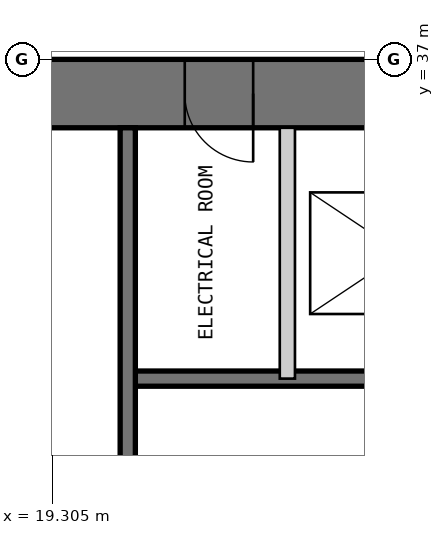
"""IFC4 building model, lengths in metres.
Left out: names, types, materials, properties, quantities, classifications, styles, units other than length and angle.
Written with IfcOpenShell. Run it as: python <this file> out.ifc"""

import sys

from ifc_helpers import new_model, si_unit, direction, frame, frame_2d, origin, place, context, subcontext, project, spatial, polyline, rectangle, outline, extrude, element, fill, save


model = new_model("IFC4")
c1 = context("Model", 3, precision=1e-05, world=origin(), true_north=direction((0.0, 1.0)))
c2 = subcontext(c1, "Body", "Model", "MODEL_VIEW")
j1 = project(units=[si_unit("LENGTHUNIT", "METRE"), si_unit("PLANEANGLEUNIT", "RADIAN")], contexts=[c1])
p1 = place(None, origin())
s1 = spatial("IfcSite", under=j1, at=p1, CompositionType="ELEMENT")
p2 = place(p1, origin())
s2 = spatial("IfcBuilding", under=s1, at=p2, CompositionType="ELEMENT")
p3 = place(p2, frame((0.0, 0.0, 130.4)))
s3 = spatial("IfcBuildingStorey", under=s2, at=p3, CompositionType="ELEMENT", Elevation=130.4)
p4 = place(p3, frame((37.0, 36.55, 0.0), z_axis=(0.0, 0.0, 1.0), x_axis=(-1.0, 0.0, 0.0)))
e1 = element("IfcWall", 1, at=p4, inside=s3, PredefinedType="SHEAR", context=c2, shape_type="SweptSolid", body=[
    extrude(outline(polyline([(0.0, -0.45), (24.0, -0.45), (23.1, 0.45), (0.9, 0.45), (0.0, -0.45)])), origin(), (0.0, 0.0, 1.0), 4.0),
])
p5 = place(p4, frame((4.9, 0.0, 0.0)))
e2 = element("IfcOpeningElement", 2, at=p5, cuts=e1, PredefinedType="OPENING", context=c2, shape_type="SweptSolid", body=[
    extrude(rectangle(XDim=1.0, YDim=2.2, at=frame_2d((0.5, 1.1))), frame((0.0, 0.46, 0.0), z_axis=(0.0, -1.0, 0.0), x_axis=(1.0, 0.0, 0.0)), (0.0, 0.0, 1.0), 0.92),
])
p6 = place(p4, frame((8.9, 0.0, 0.0)))
e3 = element("IfcOpeningElement", 3, at=p6, cuts=e1, PredefinedType="OPENING", context=c2, shape_type="SweptSolid", body=[
    extrude(rectangle(XDim=1.1, YDim=2.2, at=frame_2d((0.55, 1.1))), frame((0.0, 0.46, 0.0), z_axis=(0.0, -1.0, 0.0), x_axis=(1.0, 0.0, 0.0)), (0.0, 0.0, 1.0), 0.92),
])
p7 = place(p4, frame((15.05, 0.0, 0.0)))
e4 = element("IfcOpeningElement", 4, at=p7, cuts=e1, PredefinedType="OPENING", context=c2, shape_type="SweptSolid", body=[
    extrude(rectangle(XDim=0.9, YDim=2.2, at=frame_2d((0.45, 1.1))), frame((0.0, 0.46, 0.0), z_axis=(0.0, -1.0, 0.0), x_axis=(1.0, 0.0, 0.0)), (0.0, 0.0, 1.0), 0.92),
])
p8 = place(p4, frame((17.9, 0.0, 0.0)))
e5 = element("IfcOpeningElement", 5, at=p8, cuts=e1, PredefinedType="OPENING", context=c2, shape_type="SweptSolid", body=[
    extrude(rectangle(XDim=1.0, YDim=2.2, at=frame_2d((0.5, 1.1))), frame((0.0, 0.46, 0.0), z_axis=(0.0, -1.0, 0.0), x_axis=(1.0, 0.0, 0.0)), (0.0, 0.0, 1.0), 0.92),
])
p9 = place(p4, frame((21.4, 0.0, 0.0)))
e6 = element("IfcOpeningElement", 6, at=p9, cuts=e1, PredefinedType="OPENING", context=c2, shape_type="SweptSolid", body=[
    extrude(rectangle(XDim=1.0, YDim=2.2, at=frame_2d((0.5, 1.1))), frame((0.0, 0.46, 0.0), z_axis=(0.0, -1.0, 0.0), x_axis=(1.0, 0.0, 0.0)), (0.0, 0.0, 1.0), 0.92),
])
p10 = place(p3, frame((29.7, 32.8, 0.0), z_axis=(0.0, 0.0, 1.0), x_axis=(-1.0, 0.0, 0.0)))
e7 = element("IfcWall", 7, at=p10, inside=s3, PredefinedType="SOLIDWALL", context=c2, shape_type="SweptSolid", body=[
    extrude(rectangle(XDim=9.4, YDim=0.2, at=frame_2d((4.7, 0.0))), origin(), (0.0, 0.0, 1.0), 3.8),
])
p11 = place(p10, frame((0.25, 0.0, 0.0)))
e8 = element("IfcOpeningElement", 8, at=p11, cuts=e7, PredefinedType="OPENING", context=c2, shape_type="SweptSolid", body=[
    extrude(rectangle(XDim=1.0, YDim=2.2, at=frame_2d((0.5, 1.1))), frame((0.0, 0.11, 0.0), z_axis=(0.0, -1.0, 0.0), x_axis=(1.0, 0.0, 0.0)), (0.0, 0.0, 1.0), 0.22),
])
p12 = place(p3, frame((22.4, 36.1, 0.0), z_axis=(0.0, 0.0, 1.0), x_axis=(0.0, -1.0, 0.0)))
e9 = element("IfcWall", 9, at=p12, inside=s3, PredefinedType="PARTITIONING", context=c2, shape_type="SweptSolid", body=[
    extrude(rectangle(XDim=3.3, YDim=0.2, at=frame_2d((1.65, 0.0))), origin(), (0.0, 0.0, 1.0), 3.8),
])
p13 = place(p3, frame((20.3, 36.1, 0.0), z_axis=(0.0, 0.0, 1.0), x_axis=(0.0, -1.0, 0.0)))
e10 = element("IfcWall", 10, at=p13, inside=s3, PredefinedType="SOLIDWALL", context=c2, shape_type="SweptSolid", body=[
    extrude(rectangle(XDim=6.1, YDim=0.2, at=frame_2d((3.05, 0.0))), origin(), (0.0, 0.0, 1.0), 3.8),
])
p14 = place(p7, origin())
e11 = element("IfcDoor", 11, at=p14, inside=s3, OperationType="SINGLE_SWING_LEFT", PredefinedType="DOOR", context=c2, shape_type="SweptSolid", body=[
    extrude(rectangle(XDim=0.9, YDim=2.2, at=frame_2d((0.45, 1.1))), frame((0.0, 0.025, 0.0), z_axis=(0.0, -1.0, 0.0), x_axis=(1.0, 0.0, 0.0)), (0.0, 0.0, 1.0), 0.05),
    extrude(outline(polyline([(0.0, 0.0), (0.04, 0.0), (0.04, 2.16), (0.86, 2.16), (0.86, 0.0), (0.9, 0.0), (0.9, 2.2), (0.0, 2.2), (0.0, 0.0)])), frame((0.0, 0.3, 0.0), z_axis=(0.0, -1.0, 0.0), x_axis=(1.0, 0.0, 0.0)), (0.0, 0.0, 1.0), 0.6),
])
fill(e4, e11)
save(model, sys.argv[1])
